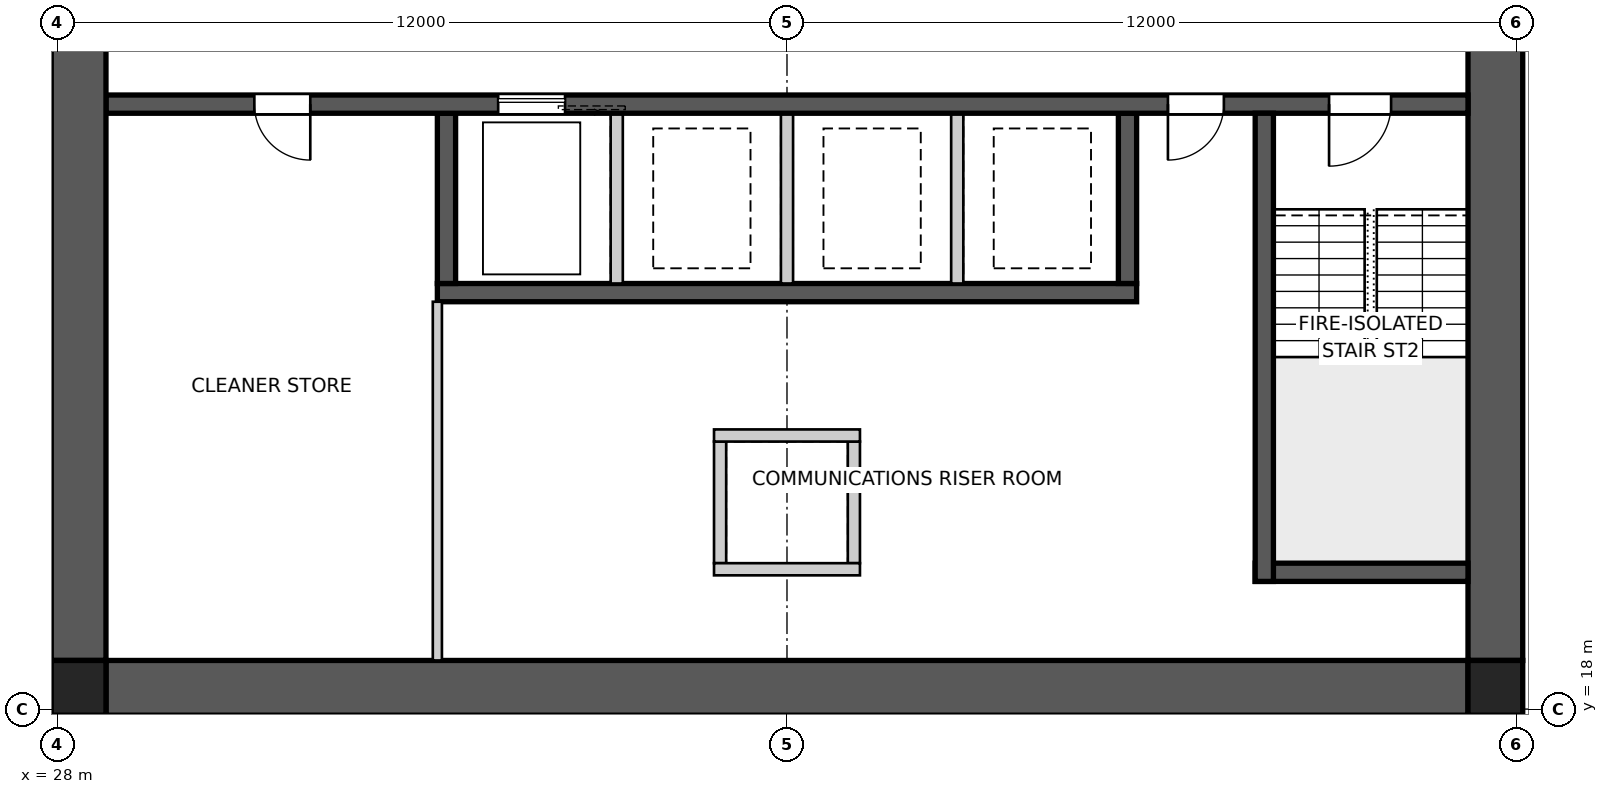
"""IFC4 building model, lengths in metres.
Left out: names, types, materials, properties, quantities, classifications, styles, units other than length and angle.
Written with IfcOpenShell. Run it as: python <this file> out.ifc"""

import sys

from ifc_helpers import new_model, si_unit, direction, frame, frame_2d, origin, origin_2d, place, context, subcontext, project, spatial, polyline, rectangle, outline, extrude, element, fill, save


model = new_model("IFC4")
c1 = context("Model", 3, precision=1e-05, world=origin(), true_north=direction((0.0, 1.0)))
c2 = subcontext(c1, "Body", "Model", "MODEL_VIEW")
j1 = project(units=[si_unit("LENGTHUNIT", "METRE"), si_unit("PLANEANGLEUNIT", "RADIAN")], contexts=[c1])
p1 = place(None, origin())
s1 = spatial("IfcSite", under=j1, at=p1, CompositionType="ELEMENT")
p2 = place(p1, origin())
s2 = spatial("IfcBuilding", under=s1, at=p2, CompositionType="ELEMENT")
p3 = place(p2, frame((0.0, 0.0, 50.6)))
s3 = spatial("IfcBuildingStorey", under=s2, at=p3, CompositionType="ELEMENT", Elevation=50.6)
p4 = place(p3, frame((51.2, 18.35, 0.0), z_axis=(0.0, 0.0, 1.0), x_axis=(-1.0, 0.0, 0.0)))
e1 = element("IfcWall", 1, at=p4, inside=s3, PredefinedType="SHEAR", context=c2, shape_type="SweptSolid", body=[
    extrude(outline(polyline([(0.0, -0.45), (22.4, -0.45), (22.4, -0.025), (22.85, -0.025), (22.85, 0.025), (22.4, 0.025), (22.4, 0.45), (0.0, 0.45), (0.0, 0.025), (-0.45, 0.025), (-0.45, -0.025), (0.0, -0.025), (0.0, -0.45)])), origin(), (0.0, 0.0, 1.0), 3.4),
])
p5 = place(p3, frame((51.65, 18.8, 0.0), z_axis=(0.0, 0.0, 1.0), x_axis=(0.0, 1.0, 0.0)))
e2 = element("IfcWall", 2, at=p5, inside=s3, PredefinedType="SHEAR", context=c2, shape_type="SweptSolid", body=[
    extrude(outline(polyline([(0.0, -0.45), (22.4, -0.45), (22.4, -0.025), (22.85, -0.025), (22.85, 0.025), (22.4, 0.025), (22.4, 0.45), (0.0, 0.45), (0.0, 0.025), (-0.45, 0.025), (-0.45, -0.025), (0.0, -0.025), (0.0, -0.45)])), origin(), (0.0, 0.0, 1.0), 3.4),
])
p6 = place(p5, frame((11.14, 0.0, 0.0)))
e3 = element("IfcOpeningElement", 3, at=p6, cuts=e2, PredefinedType="OPENING", context=c2, shape_type="SweptSolid", body=[
    extrude(rectangle(XDim=1.02, YDim=2.4, at=frame_2d((0.51, 1.2))), frame((0.0, 0.46, 0.0), z_axis=(0.0, -1.0, 0.0), x_axis=(1.0, 0.0, 0.0)), (0.0, 0.0, 1.0), 0.92),
])
p7 = place(p3, frame((28.35, 41.2, 0.0), z_axis=(0.0, 0.0, 1.0), x_axis=(0.0, -1.0, 0.0)))
e4 = element("IfcWall", 4, at=p7, inside=s3, PredefinedType="SHEAR", context=c2, shape_type="SweptSolid", body=[
    extrude(outline(polyline([(0.0, -0.45), (22.4, -0.45), (22.4, -0.025), (22.85, -0.025), (22.85, 0.025), (22.4, 0.025), (22.4, 0.45), (0.0, 0.45), (0.0, 0.025), (-0.45, 0.025), (-0.45, -0.025), (0.0, -0.025), (0.0, -0.45)])), origin(), (0.0, 0.0, 1.0), 3.4),
])
p8 = place(p7, frame((11.14, 0.0, 0.0)))
e5 = element("IfcOpeningElement", 5, at=p8, cuts=e4, PredefinedType="OPENING", context=c2, shape_type="SweptSolid", body=[
    extrude(rectangle(XDim=1.02, YDim=2.4, at=frame_2d((0.51, 1.2))), frame((0.0, 0.46, 0.0), z_axis=(0.0, -1.0, 0.0), x_axis=(1.0, 0.0, 0.0)), (0.0, 0.0, 1.0), 0.92),
])
p9 = place(p3, frame((51.2, 27.95, 0.0), z_axis=(0.0, 0.0, 1.0), x_axis=(-1.0, 0.0, 0.0)))
e6 = element("IfcWall", 6, at=p9, inside=s3, PredefinedType="SHEAR", context=c2, shape_type="SweptSolid", body=[
    extrude(rectangle(XDim=22.4, YDim=0.3, at=frame_2d((11.2, 0.0))), origin(), (0.0, 0.0, 1.0), 3.4),
])
p10 = place(p9, frame((19.04, 0.0, 0.0)))
e7 = element("IfcOpeningElement", 7, at=p10, cuts=e6, PredefinedType="OPENING", context=c2, shape_type="SweptSolid", body=[
    extrude(rectangle(XDim=0.92, YDim=2.1, at=frame_2d((0.46, 1.05))), frame((0.0, 0.16, 0.0), z_axis=(0.0, -1.0, 0.0), x_axis=(1.0, 0.0, 0.0)), (0.0, 0.0, 1.0), 0.32),
])
p11 = place(p9, frame((1.265, 0.0, 0.0)))
e8 = element("IfcOpeningElement", 8, at=p11, cuts=e6, PredefinedType="OPENING", context=c2, shape_type="SweptSolid", body=[
    extrude(rectangle(XDim=1.02, YDim=2.1, at=frame_2d((0.51, 1.05))), frame((0.0, 0.16, 0.0), z_axis=(0.0, -1.0, 0.0), x_axis=(1.0, 0.0, 0.0)), (0.0, 0.0, 1.0), 0.32),
])
p12 = place(p9, frame((4.015, 0.0, 0.0)))
e9 = element("IfcOpeningElement", 9, at=p12, cuts=e6, PredefinedType="OPENING", context=c2, shape_type="SweptSolid", body=[
    extrude(rectangle(XDim=0.92, YDim=2.1, at=frame_2d((0.46, 1.05))), frame((0.0, 0.16, 0.0), z_axis=(0.0, -1.0, 0.0), x_axis=(1.0, 0.0, 0.0)), (0.0, 0.0, 1.0), 0.32),
])
p13 = place(p9, frame((14.85, 0.0, 0.0)))
e10 = element("IfcOpeningElement", 10, at=p13, cuts=e6, PredefinedType="OPENING", context=c2, shape_type="SweptSolid", body=[
    extrude(rectangle(XDim=1.1, YDim=2.1, at=frame_2d((0.55, 1.05))), frame((0.0, 0.16, 0.0), z_axis=(0.0, -1.0, 0.0), x_axis=(1.0, 0.0, 0.0)), (0.0, 0.0, 1.0), 0.32),
])
p14 = place(p3, frame((45.75, 24.85, 0.0), z_axis=(0.0, 0.0, 1.0), x_axis=(-1.0, 0.0, 0.0)))
e11 = element("IfcWall", 11, at=p14, inside=s3, PredefinedType="SHEAR", context=c2, shape_type="SweptSolid", body=[
    extrude(rectangle(XDim=11.5, YDim=0.3, at=frame_2d((5.75, 0.0))), origin(), (0.0, 0.0, 1.0), 3.4),
])
p15 = place(p3, frame((45.6, 27.8, 0.0), z_axis=(0.0, 0.0, 1.0), x_axis=(0.0, -1.0, 0.0)))
e12 = element("IfcWall", 12, at=p15, inside=s3, PredefinedType="SHEAR", context=c2, shape_type="SweptSolid", body=[
    extrude(rectangle(XDim=2.8, YDim=0.3, at=frame_2d((1.4, 0.0))), origin(), (0.0, 0.0, 1.0), 3.4),
])
for number, where, z_axis, x_axis in (
    (13, (42.8, 27.8, 0.0), (0.0, 0.0, 1.0), (0.0, -1.0, 0.0)),
    (14, (40.0, 27.8, 0.0), (0.0, 0.0, 1.0), (0.0, -1.0, 0.0)),
    (15, (37.2, 27.8, 0.0), (0.0, 0.0, 1.0), (0.0, -1.0, 0.0)),
):
    element("IfcWall", number, at=place(p3, frame(where, z_axis=z_axis, x_axis=x_axis)), inside=s3, PredefinedType="SOLIDWALL", context=c2, shape_type="SweptSolid", body=[
        extrude(rectangle(XDim=2.8, YDim=0.2, at=frame_2d((1.4, 0.0))), origin(), (0.0, 0.0, 1.0), 3.4),
    ])
p16 = place(p3, frame((34.4, 27.8, 0.0), z_axis=(0.0, 0.0, 1.0), x_axis=(0.0, -1.0, 0.0)))
e16 = element("IfcWall", 16, at=p16, inside=s3, PredefinedType="SHEAR", context=c2, shape_type="SweptSolid", body=[
    extrude(rectangle(XDim=2.8, YDim=0.3, at=frame_2d((1.4, 0.0))), origin(), (0.0, 0.0, 1.0), 3.4),
])
p17 = place(p3, frame((47.85, 27.8, 0.0), z_axis=(0.0, 0.0, 1.0), x_axis=(0.0, -1.0, 0.0)))
e17 = element("IfcWall", 17, at=p17, inside=s3, PredefinedType="SHEAR", context=c2, shape_type="SweptSolid", body=[
    extrude(rectangle(XDim=7.7, YDim=0.3, at=frame_2d((3.85, 0.0))), origin(), (0.0, 0.0, 1.0), 3.4),
])
p18 = place(p3, frame((51.2, 20.25, 0.0), z_axis=(0.0, 0.0, 1.0), x_axis=(-1.0, 0.0, 0.0)))
e18 = element("IfcWall", 18, at=p18, inside=s3, PredefinedType="SHEAR", context=c2, shape_type="SweptSolid", body=[
    extrude(rectangle(XDim=3.5, YDim=0.3, at=frame_2d((1.75, 0.0))), origin(), (0.0, 0.0, 1.0), 3.4),
])
for number, where, z_axis, x_axis in (
    (19, (38.9, 22.4, 0.0), (0.0, 0.0, 1.0), (0.0, -1.0, 0.0)),
    (20, (41.1, 22.4, 0.0), (0.0, 0.0, 1.0), (0.0, -1.0, 0.0)),
):
    element("IfcWall", number, at=place(p3, frame(where, z_axis=z_axis, x_axis=x_axis)), inside=s3, PredefinedType="SOLIDWALL", context=c2, shape_type="SweptSolid", body=[
        extrude(rectangle(XDim=2.0, YDim=0.2, at=frame_2d((1.0, 0.0))), origin(), (0.0, 0.0, 1.0), 3.4),
    ])
for number, where, z_axis, x_axis in (
    (21, (38.8, 22.5, 0.0), (0.0, 0.0, 1.0), (1.0, 0.0, 0.0)),
    (22, (38.8, 20.3, 0.0), (0.0, 0.0, 1.0), (1.0, 0.0, 0.0)),
):
    element("IfcWall", number, at=place(p3, frame(where, z_axis=z_axis, x_axis=x_axis)), inside=s3, PredefinedType="SOLIDWALL", context=c2, shape_type="SweptSolid", body=[
        extrude(rectangle(XDim=2.4, YDim=0.2, at=frame_2d((1.2, 0.0))), origin(), (0.0, 0.0, 1.0), 3.4),
    ])
for number, where, z_axis, x_axis in (
    (23, (28.35, 18.35, 0.0), (0.0, 0.0, 1.0), (1.0, 0.0, 0.0)),
    (24, (51.65, 18.35, 0.0), (0.0, 0.0, 1.0), (1.0, 0.0, 0.0)),
):
    element("IfcColumn", number, at=place(p3, frame(where, z_axis=z_axis, x_axis=x_axis)), inside=s3, PredefinedType="COLUMN", context=c2, shape_type="SweptSolid", body=[
        extrude(rectangle(XDim=0.9, YDim=0.9, at=origin_2d()), origin(), (0.0, 0.0, 1.0), 3.4),
    ])
p19 = place(p3, frame((34.25, 18.8, 0.0), z_axis=(0.0, 0.0, 1.0), x_axis=(0.0, 1.0, 0.0)))
e25 = element("IfcWall", 25, at=p19, inside=s3, PredefinedType="SOLIDWALL", context=c2, shape_type="SweptSolid", body=[
    extrude(rectangle(XDim=5.9, YDim=0.15, at=frame_2d((2.95, 0.0))), origin(), (0.0, 0.0, 1.0), 3.25),
])
p20 = place(p10, origin())
e26 = element("IfcDoor", 26, at=p20, inside=s3, OperationType="SINGLE_SWING_LEFT", PredefinedType="DOOR", context=c2, shape_type="SweptSolid", body=[
    extrude(rectangle(XDim=0.92, YDim=2.1, at=frame_2d((0.46, 1.05))), frame((0.0, 0.025, 0.0), z_axis=(0.0, -1.0, 0.0), x_axis=(1.0, 0.0, 0.0)), (0.0, 0.0, 1.0), 0.05),
])
fill(e7, e26)
p21 = place(p11, origin())
e27 = element("IfcDoor", 27, at=p21, inside=s3, OperationType="SINGLE_SWING_RIGHT", PredefinedType="DOOR", context=c2, shape_type="SweptSolid", body=[
    extrude(rectangle(XDim=1.02, YDim=2.1, at=frame_2d((0.51, 1.05))), frame((0.0, 0.025, 0.0), z_axis=(0.0, -1.0, 0.0), x_axis=(1.0, 0.0, 0.0)), (0.0, 0.0, 1.0), 0.05),
])
fill(e8, e27)
p22 = place(p12, origin())
e28 = element("IfcDoor", 28, at=p22, inside=s3, OperationType="SINGLE_SWING_RIGHT", PredefinedType="DOOR", context=c2, shape_type="SweptSolid", body=[
    extrude(rectangle(XDim=0.92, YDim=2.1, at=frame_2d((0.46, 1.05))), frame((0.0, 0.025, 0.0), z_axis=(0.0, -1.0, 0.0), x_axis=(1.0, 0.0, 0.0)), (0.0, 0.0, 1.0), 0.05),
])
fill(e9, e28)
p23 = place(p13, origin())
e29 = element("IfcDoor", 29, at=p23, inside=s3, OperationType="SLIDING_TO_LEFT", PredefinedType="DOOR", context=c2, shape_type="SweptSolid", body=[
    extrude(rectangle(XDim=1.1, YDim=2.1, at=frame_2d((0.55, 1.05))), frame((0.0, 0.025, 0.0), z_axis=(0.0, -1.0, 0.0), x_axis=(1.0, 0.0, 0.0)), (0.0, 0.0, 1.0), 0.05),
])
fill(e10, e29)
save(model, sys.argv[1])
